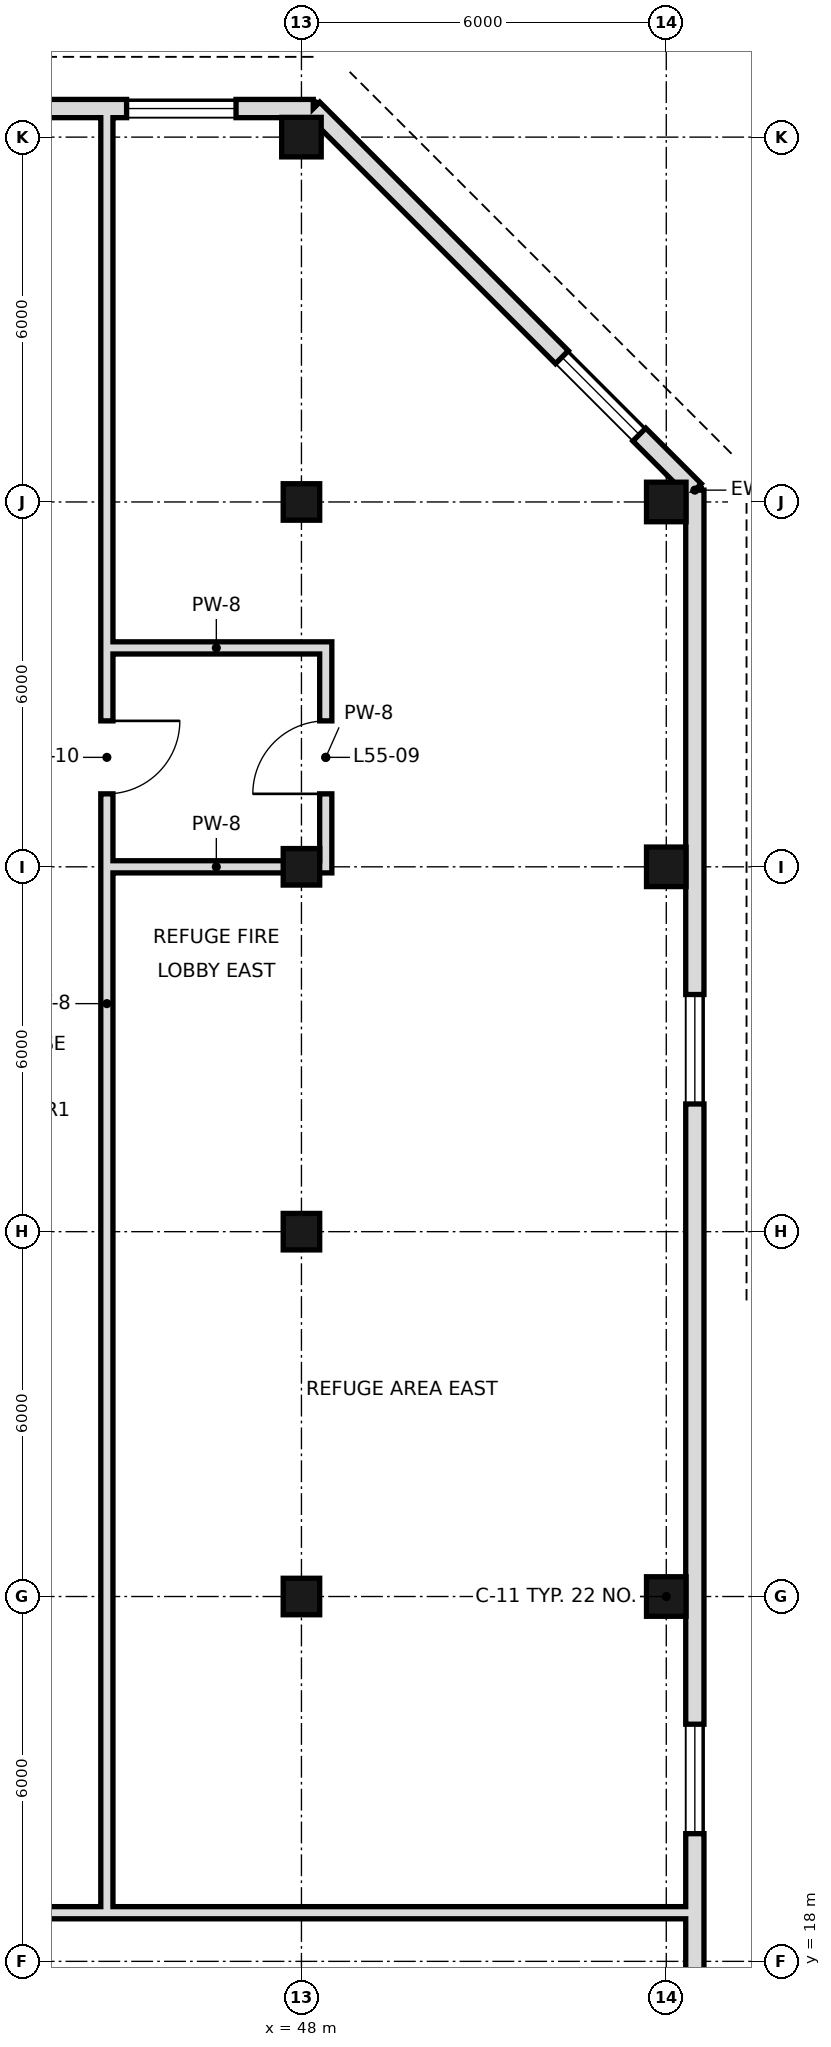
"""IFC4 building model, lengths in metres.
Left out: names, types, materials, properties, quantities, classifications, styles, units other than length and angle.
Written with IfcOpenShell. Run it as: python <this file> out.ifc"""

import sys

from ifc_helpers import new_model, si_unit, direction, frame, frame_2d, origin, origin_2d, place, context, subcontext, project, spatial, rectangle, hollow_rectangle, extrude, element, fill, save


model = new_model("IFC4")
c1 = context("Model", 3, precision=1e-05, world=origin(), true_north=direction((0.0, 1.0)))
c2 = subcontext(c1, "Body", "Model", "MODEL_VIEW")
j1 = project(units=[si_unit("LENGTHUNIT", "METRE"), si_unit("PLANEANGLEUNIT", "RADIAN")], contexts=[c1])
p1 = place(None, origin())
s1 = spatial("IfcSite", under=j1, at=p1, CompositionType="ELEMENT")
p2 = place(p1, origin())
s2 = spatial("IfcBuilding", under=s1, at=p2, CompositionType="ELEMENT")
p3 = place(p2, frame((0.0, 0.0, 234.2)))
s3 = spatial("IfcBuildingStorey", under=s2, at=p3, CompositionType="ELEMENT", Elevation=234.2)
for number, where, z_axis, x_axis in (
    (1, (48.0, 24.0, 0.0), (0.0, 0.0, 1.0), (1.0, 0.0, 0.0)),
    (2, (48.0, 30.0, 0.0), (0.0, 0.0, 1.0), (1.0, 0.0, 0.0)),
    (3, (48.0, 36.0, 0.0), (0.0, 0.0, 1.0), (1.0, 0.0, 0.0)),
    (4, (48.0, 42.0, 0.0), (0.0, 0.0, 1.0), (1.0, 0.0, 0.0)),
):
    element("IfcColumn", number, at=place(p3, frame(where, z_axis=z_axis, x_axis=x_axis)), inside=s3, PredefinedType="COLUMN", context=c2, shape_type="SweptSolid", body=[
        extrude(hollow_rectangle(XDim=0.6, YDim=0.6, WallThickness=0.028, at=origin_2d()), origin(), (0.0, 0.0, 1.0), 5.4),
    ])
for number, where, z_axis, x_axis in (
    (5, (48.0, 48.0, 0.0), (0.0, 0.0, 1.0), (1.0, 0.0, 0.0)),
    (6, (54.0, 24.0, 0.0), (0.0, 0.0, 1.0), (1.0, 0.0, 0.0)),
    (7, (54.0, 36.0, 0.0), (0.0, 0.0, 1.0), (1.0, 0.0, 0.0)),
    (8, (54.0, 42.0, 0.0), (0.0, 0.0, 1.0), (1.0, 0.0, 0.0)),
):
    element("IfcColumn", number, at=place(p3, frame(where, z_axis=z_axis, x_axis=x_axis)), inside=s3, PredefinedType="COLUMN", context=c2, shape_type="SweptSolid", body=[
        extrude(hollow_rectangle(XDim=0.65, YDim=0.65, WallThickness=0.032, at=origin_2d()), origin(), (0.0, 0.0, 1.0), 5.4),
    ])
p4 = place(p3, frame((54.47, 5.805, 0.0), z_axis=(0.0, 0.0, 1.0), x_axis=(0.0, 1.0, 0.0)))
e9 = element("IfcWall", 9, at=p4, inside=s3, PredefinedType="SOLIDWALL", context=c2, shape_type="SweptSolid", body=[
    extrude(rectangle(XDim=36.389, YDim=0.3, at=frame_2d((18.195, 0.0))), origin(), (0.0, 0.0, 1.0), 5.22),
])
p5 = place(p4, frame((2.17, 0.0, 0.9)))
e10 = element("IfcOpeningElement", 10, at=p5, cuts=e9, PredefinedType="OPENING", context=c2, shape_type="SweptSolid", body=[
    extrude(rectangle(XDim=1.8, YDim=1.5, at=frame_2d((0.9, 0.75))), frame((0.0, 0.16, 0.0), z_axis=(0.0, -1.0, 0.0), x_axis=(1.0, 0.0, 0.0)), (0.0, 0.0, 1.0), 0.32),
])
p6 = place(p4, frame((14.295, 0.0, 0.9)))
e11 = element("IfcOpeningElement", 11, at=p6, cuts=e9, PredefinedType="OPENING", context=c2, shape_type="SweptSolid", body=[
    extrude(rectangle(XDim=1.8, YDim=1.5, at=frame_2d((0.9, 0.75))), frame((0.0, 0.16, 0.0), z_axis=(0.0, -1.0, 0.0), x_axis=(1.0, 0.0, 0.0)), (0.0, 0.0, 1.0), 0.32),
])
p7 = place(p4, frame((26.295, 0.0, 0.9)))
e12 = element("IfcOpeningElement", 12, at=p7, cuts=e9, PredefinedType="OPENING", context=c2, shape_type="SweptSolid", body=[
    extrude(rectangle(XDim=1.8, YDim=1.5, at=frame_2d((0.9, 0.75))), frame((0.0, 0.16, 0.0), z_axis=(0.0, -1.0, 0.0), x_axis=(1.0, 0.0, 0.0)), (0.0, 0.0, 1.0), 0.32),
])
p8 = place(p3, frame((54.47, 42.195, 0.0), z_axis=(0.0, 0.0, 1.0), x_axis=(-0.707106781187, 0.707106781187, 0.0)))
e13 = element("IfcWall", 13, at=p8, inside=s3, PredefinedType="SOLIDWALL", context=c2, shape_type="SweptSolid", body=[
    extrude(rectangle(XDim=8.875, YDim=0.3, at=frame_2d((4.438, 0.0))), origin(), (0.0, 0.0, 1.0), 5.22),
])
p9 = place(p8, frame((1.292, 0.0, 0.9)))
e14 = element("IfcOpeningElement", 14, at=p9, cuts=e13, PredefinedType="OPENING", context=c2, shape_type="SweptSolid", body=[
    extrude(rectangle(XDim=1.8, YDim=1.5, at=frame_2d((0.9, 0.75))), frame((0.0, 0.16, 0.0), z_axis=(0.0, -1.0, 0.0), x_axis=(1.0, 0.0, 0.0)), (0.0, 0.0, 1.0), 0.32),
])
p10 = place(p3, frame((48.195, 48.47, 0.0), z_axis=(0.0, 0.0, 1.0), x_axis=(-1.0, 0.0, 0.0)))
e15 = element("IfcWall", 15, at=p10, inside=s3, PredefinedType="SOLIDWALL", context=c2, shape_type="SweptSolid", body=[
    extrude(rectangle(XDim=54.389, YDim=0.3, at=frame_2d((27.195, 0.0))), origin(), (0.0, 0.0, 1.0), 5.22),
])
p11 = place(p10, frame((1.271, 0.0, 0.9)))
e16 = element("IfcOpeningElement", 16, at=p11, cuts=e15, PredefinedType="OPENING", context=c2, shape_type="SweptSolid", body=[
    extrude(rectangle(XDim=1.8, YDim=1.5, at=frame_2d((0.9, 0.75))), frame((0.0, 0.16, 0.0), z_axis=(0.0, -1.0, 0.0), x_axis=(1.0, 0.0, 0.0)), (0.0, 0.0, 1.0), 0.32),
])
p12 = place(p10, frame((14.295, 0.0, 0.9)))
e17 = element("IfcOpeningElement", 17, at=p12, cuts=e15, PredefinedType="OPENING", context=c2, shape_type="SweptSolid", body=[
    extrude(rectangle(XDim=1.8, YDim=1.5, at=frame_2d((0.9, 0.75))), frame((0.0, 0.16, 0.0), z_axis=(0.0, -1.0, 0.0), x_axis=(1.0, 0.0, 0.0)), (0.0, 0.0, 1.0), 0.32),
])
p13 = place(p10, frame((26.295, 0.0, 0.9)))
e18 = element("IfcOpeningElement", 18, at=p13, cuts=e15, PredefinedType="OPENING", context=c2, shape_type="SweptSolid", body=[
    extrude(rectangle(XDim=1.8, YDim=1.5, at=frame_2d((0.9, 0.75))), frame((0.0, 0.16, 0.0), z_axis=(0.0, -1.0, 0.0), x_axis=(1.0, 0.0, 0.0)), (0.0, 0.0, 1.0), 0.32),
])
p14 = place(p10, frame((38.295, 0.0, 0.9)))
e19 = element("IfcOpeningElement", 19, at=p14, cuts=e15, PredefinedType="OPENING", context=c2, shape_type="SweptSolid", body=[
    extrude(rectangle(XDim=1.8, YDim=1.5, at=frame_2d((0.9, 0.75))), frame((0.0, 0.16, 0.0), z_axis=(0.0, -1.0, 0.0), x_axis=(1.0, 0.0, 0.0)), (0.0, 0.0, 1.0), 0.32),
])
p15 = place(p10, frame((50.419, 0.0, 0.9)))
e20 = element("IfcOpeningElement", 20, at=p15, cuts=e15, PredefinedType="OPENING", context=c2, shape_type="SweptSolid", body=[
    extrude(rectangle(XDim=1.8, YDim=1.5, at=frame_2d((0.9, 0.75))), frame((0.0, 0.16, 0.0), z_axis=(0.0, -1.0, 0.0), x_axis=(1.0, 0.0, 0.0)), (0.0, 0.0, 1.0), 0.32),
])
p16 = place(p3, frame((44.8, 18.9, 0.0), z_axis=(0.0, 0.0, 1.0), x_axis=(0.0, 1.0, 0.0)))
e21 = element("IfcWall", 21, at=p16, inside=s3, PredefinedType="SOLIDWALL", context=c2, shape_type="SweptSolid", body=[
    extrude(rectangle(XDim=29.7, YDim=0.2, at=frame_2d((14.85, 0.0))), origin(), (0.0, 0.0, 1.0), 4.52),
])
p17 = place(p16, frame((18.3, 0.0, 0.0)))
e22 = element("IfcOpeningElement", 22, at=p17, cuts=e21, PredefinedType="OPENING", context=c2, shape_type="SweptSolid", body=[
    extrude(rectangle(XDim=1.2, YDim=2.4, at=frame_2d((0.6, 1.2))), frame((0.0, 0.11, 0.0), z_axis=(0.0, -1.0, 0.0), x_axis=(1.0, 0.0, 0.0)), (0.0, 0.0, 1.0), 0.22),
])
p18 = place(p3, frame((48.4, 35.9, 0.0), z_axis=(0.0, 0.0, 1.0), x_axis=(0.0, 1.0, 0.0)))
e23 = element("IfcWall", 23, at=p18, inside=s3, PredefinedType="SOLIDWALL", context=c2, shape_type="SweptSolid", body=[
    extrude(rectangle(XDim=3.8, YDim=0.2, at=frame_2d((1.9, 0.0))), origin(), (0.0, 0.0, 1.0), 5.22),
])
p19 = place(p18, frame((1.3, 0.0, 0.0)))
e24 = element("IfcOpeningElement", 24, at=p19, cuts=e23, PredefinedType="OPENING", context=c2, shape_type="SweptSolid", body=[
    extrude(rectangle(XDim=1.2, YDim=2.4, at=frame_2d((0.6, 1.2))), frame((0.0, 0.11, 0.0), z_axis=(0.0, -1.0, 0.0), x_axis=(1.0, 0.0, 0.0)), (0.0, 0.0, 1.0), 0.22),
])
p20 = place(p3, frame((-12.6, 18.8, 0.0), z_axis=(0.0, 0.0, 1.0), x_axis=(1.0, 0.0, 0.0)))
e25 = element("IfcWall", 25, at=p20, inside=s3, PredefinedType="SOLIDWALL", context=c2, shape_type="SweptSolid", body=[
    extrude(rectangle(XDim=67.2, YDim=0.2, at=frame_2d((33.6, 0.0))), origin(), (0.0, 0.0, 1.0), 4.52),
])
p21 = place(p20, frame((23.2, 0.0, 0.0)))
e26 = element("IfcOpeningElement", 26, at=p21, cuts=e25, PredefinedType="OPENING", context=c2, shape_type="SweptSolid", body=[
    extrude(rectangle(XDim=1.2, YDim=2.4, at=frame_2d((0.6, 1.2))), frame((0.0, 0.11, 0.0), z_axis=(0.0, -1.0, 0.0), x_axis=(1.0, 0.0, 0.0)), (0.0, 0.0, 1.0), 0.22),
])
p22 = place(p3, frame((44.9, 36.0, 0.0), z_axis=(0.0, 0.0, 1.0), x_axis=(1.0, 0.0, 0.0)))
e27 = element("IfcWall", 27, at=p22, inside=s3, PredefinedType="SOLIDWALL", context=c2, shape_type="SweptSolid", body=[
    extrude(rectangle(XDim=3.4, YDim=0.2, at=frame_2d((1.7, 0.0))), origin(), (0.0, 0.0, 1.0), 5.22),
])
p23 = place(p3, frame((44.9, 39.6, 0.0), z_axis=(0.0, 0.0, 1.0), x_axis=(1.0, 0.0, 0.0)))
e28 = element("IfcWall", 28, at=p23, inside=s3, PredefinedType="SOLIDWALL", context=c2, shape_type="SweptSolid", body=[
    extrude(rectangle(XDim=3.4, YDim=0.2, at=frame_2d((1.7, 0.0))), origin(), (0.0, 0.0, 1.0), 4.77),
])
p24 = place(p6, origin())
e29 = element("IfcWindow", 29, at=p24, inside=s3, PartitioningType="SINGLE_PANEL", PredefinedType="WINDOW", context=c2, shape_type="SweptSolid", body=[
    extrude(rectangle(XDim=1.8, YDim=1.5, at=frame_2d((0.9, 0.75))), frame((0.0, 0.03, 0.0), z_axis=(0.0, -1.0, 0.0), x_axis=(1.0, 0.0, 0.0)), (0.0, 0.0, 1.0), 0.06),
])
fill(e11, e29)
p25 = place(p7, origin())
e30 = element("IfcWindow", 30, at=p25, inside=s3, PartitioningType="SINGLE_PANEL", PredefinedType="WINDOW", context=c2, shape_type="SweptSolid", body=[
    extrude(rectangle(XDim=1.8, YDim=1.5, at=frame_2d((0.9, 0.75))), frame((0.0, 0.03, 0.0), z_axis=(0.0, -1.0, 0.0), x_axis=(1.0, 0.0, 0.0)), (0.0, 0.0, 1.0), 0.06),
])
fill(e12, e30)
p26 = place(p9, origin())
e31 = element("IfcWindow", 31, at=p26, inside=s3, PartitioningType="SINGLE_PANEL", PredefinedType="WINDOW", context=c2, shape_type="SweptSolid", body=[
    extrude(rectangle(XDim=1.8, YDim=1.5, at=frame_2d((0.9, 0.75))), frame((0.0, 0.03, 0.0), z_axis=(0.0, -1.0, 0.0), x_axis=(1.0, 0.0, 0.0)), (0.0, 0.0, 1.0), 0.06),
])
fill(e14, e31)
p27 = place(p11, origin())
e32 = element("IfcWindow", 32, at=p27, inside=s3, PartitioningType="SINGLE_PANEL", PredefinedType="WINDOW", context=c2, shape_type="SweptSolid", body=[
    extrude(rectangle(XDim=1.8, YDim=1.5, at=frame_2d((0.9, 0.75))), frame((0.0, 0.03, 0.0), z_axis=(0.0, -1.0, 0.0), x_axis=(1.0, 0.0, 0.0)), (0.0, 0.0, 1.0), 0.06),
])
fill(e16, e32)
p28 = place(p19, origin())
e33 = element("IfcDoor", 33, at=p28, inside=s3, OperationType="SINGLE_SWING_LEFT", PredefinedType="DOOR", context=c2, shape_type="SweptSolid", body=[
    extrude(rectangle(XDim=1.2, YDim=2.4, at=frame_2d((0.6, 1.2))), frame((0.0, 0.025, 0.0), z_axis=(0.0, -1.0, 0.0), x_axis=(1.0, 0.0, 0.0)), (0.0, 0.0, 1.0), 0.05),
])
fill(e24, e33)
p29 = place(p17, origin())
e34 = element("IfcDoor", 34, at=p29, inside=s3, OperationType="SINGLE_SWING_RIGHT", PredefinedType="DOOR", context=c2, shape_type="SweptSolid", body=[
    extrude(rectangle(XDim=1.2, YDim=2.4, at=frame_2d((0.6, 1.2))), frame((0.0, 0.025, 0.0), z_axis=(0.0, -1.0, 0.0), x_axis=(1.0, 0.0, 0.0)), (0.0, 0.0, 1.0), 0.05),
])
fill(e22, e34)
save(model, sys.argv[1])
